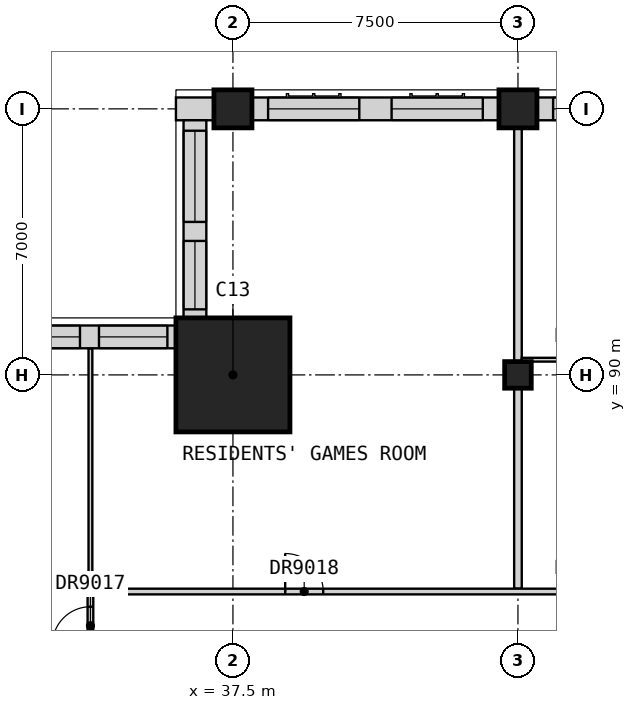
"""IFC4 building model, lengths in metres.
Left out: names, types, materials, properties, quantities, classifications, styles, units other than length and angle.
Written with IfcOpenShell. Run it as: python <this file> out.ifc"""

import sys

from ifc_helpers import new_model, si_unit, direction, frame, frame_2d, origin, origin_2d, place, context, subcontext, project, spatial, rectangle, extrude, element, fill, save


model = new_model("IFC4")
c1 = context("Model", 3, precision=1e-05, world=origin(), true_north=direction((0.0, 1.0)))
c2 = subcontext(c1, "Body", "Model", "MODEL_VIEW")
j1 = project(units=[si_unit("LENGTHUNIT", "METRE"), si_unit("PLANEANGLEUNIT", "RADIAN")], contexts=[c1])
p1 = place(None, origin())
s1 = spatial("IfcSite", under=j1, at=p1, CompositionType="ELEMENT")
p2 = place(p1, origin())
s2 = spatial("IfcBuilding", under=s1, at=p2, CompositionType="ELEMENT")
p3 = place(p2, frame((0.0, 0.0, 269.7)))
s3 = spatial("IfcBuildingStorey", under=s2, at=p3, CompositionType="ELEMENT", Elevation=269.7)
p4 = place(p3, frame((37.5, 97.0, 0.0), z_axis=(0.0, 0.0, 1.0), x_axis=(1.0, 0.0, 0.0)))
e1 = element("IfcColumn", 1, at=p4, inside=s3, PredefinedType="COLUMN", context=c2, shape_type="SweptSolid", body=[
    extrude(rectangle(XDim=1.0, YDim=1.0, at=origin_2d()), origin(), (0.0, 0.0, 1.0), 3.5),
])
p5 = place(p3, frame((45.0, 90.0, 0.0), z_axis=(0.0, 0.0, 1.0), x_axis=(1.0, 0.0, 0.0)))
e2 = element("IfcColumn", 2, at=p5, inside=s3, PredefinedType="COLUMN", context=c2, shape_type="SweptSolid", body=[
    extrude(rectangle(XDim=0.7, YDim=0.7, at=origin_2d()), origin(), (0.0, 0.0, 1.0), 3.5),
])
p6 = place(p3, frame((45.0, 97.0, 0.0), z_axis=(0.0, 0.0, 1.0), x_axis=(1.0, 0.0, 0.0)))
e3 = element("IfcColumn", 3, at=p6, inside=s3, PredefinedType="COLUMN", context=c2, shape_type="SweptSolid", body=[
    extrude(rectangle(XDim=1.0, YDim=1.0, at=origin_2d()), origin(), (0.0, 0.0, 1.0), 3.5),
])
p7 = place(p3, frame((37.5, 90.0, 0.0), z_axis=(0.0, 0.0, 1.0), x_axis=(1.0, 0.0, 0.0)))
e4 = element("IfcColumn", 4, at=p7, inside=s3, PredefinedType="COLUMN", context=c2, shape_type="SweptSolid", body=[
    extrude(rectangle(XDim=3.0, YDim=3.0, at=origin_2d()), origin(), (0.0, 0.0, 1.0), 3.5),
])
p8 = place(p3, frame((52.0, 97.0, 0.0), z_axis=(0.0, 0.0, 1.0), x_axis=(-1.0, 0.0, 0.0)))
e5 = element("IfcWall", 5, at=p8, inside=s3, PredefinedType="SOLIDWALL", context=c2, shape_type="SweptSolid", body=[
    extrude(rectangle(XDim=6.5, YDim=0.6, at=frame_2d((3.25, 0.0))), origin(), (0.0, 0.0, 1.0), 2.75),
])
p9 = place(p8, frame((3.675, 0.0, 0.8)))
e6 = element("IfcOpeningElement", 6, at=p9, cuts=e5, PredefinedType="OPENING", context=c2, shape_type="SweptSolid", body=[
    extrude(rectangle(XDim=2.4, YDim=1.8, at=frame_2d((1.2, 0.9))), frame((0.0, 0.31, 0.0), z_axis=(0.0, -1.0, 0.0), x_axis=(1.0, 0.0, 0.0)), (0.0, 0.0, 1.0), 0.62),
])
p10 = place(p8, frame((0.425, 0.0, 0.8)))
e7 = element("IfcOpeningElement", 7, at=p10, cuts=e5, PredefinedType="OPENING", context=c2, shape_type="SweptSolid", body=[
    extrude(rectangle(XDim=2.4, YDim=1.8, at=frame_2d((1.2, 0.9))), frame((0.0, 0.31, 0.0), z_axis=(0.0, -1.0, 0.0), x_axis=(1.0, 0.0, 0.0)), (0.0, 0.0, 1.0), 0.62),
])
p11 = place(p3, frame((44.5, 97.0, 0.0), z_axis=(0.0, 0.0, 1.0), x_axis=(-1.0, 0.0, 0.0)))
e8 = element("IfcWall", 8, at=p11, inside=s3, PredefinedType="SOLIDWALL", context=c2, shape_type="SweptSolid", body=[
    extrude(rectangle(XDim=6.5, YDim=0.6, at=frame_2d((3.25, 0.0))), origin(), (0.0, 0.0, 1.0), 2.75),
])
p12 = place(p11, frame((3.675, 0.0, 0.8)))
e9 = element("IfcOpeningElement", 9, at=p12, cuts=e8, PredefinedType="OPENING", context=c2, shape_type="SweptSolid", body=[
    extrude(rectangle(XDim=2.4, YDim=1.8, at=frame_2d((1.2, 0.9))), frame((0.0, 0.31, 0.0), z_axis=(0.0, -1.0, 0.0), x_axis=(1.0, 0.0, 0.0)), (0.0, 0.0, 1.0), 0.62),
])
p13 = place(p11, frame((0.425, 0.0, 0.8)))
e10 = element("IfcOpeningElement", 10, at=p13, cuts=e8, PredefinedType="OPENING", context=c2, shape_type="SweptSolid", body=[
    extrude(rectangle(XDim=2.4, YDim=1.8, at=frame_2d((1.2, 0.9))), frame((0.0, 0.31, 0.0), z_axis=(0.0, -1.0, 0.0), x_axis=(1.0, 0.0, 0.0)), (0.0, 0.0, 1.0), 0.62),
])
p14 = place(p3, frame((37.0, 97.0, 0.0), z_axis=(0.0, 0.0, 1.0), x_axis=(-1.0, 0.0, 0.0)))
e11 = element("IfcWall", 11, at=p14, inside=s3, PredefinedType="SOLIDWALL", context=c2, shape_type="SweptSolid", body=[
    extrude(rectangle(XDim=1.0, YDim=0.6, at=frame_2d((0.5, 0.0))), origin(), (0.0, 0.0, 1.0), 3.25),
])
p15 = place(p3, frame((36.5, 96.7, 0.0), z_axis=(0.0, 0.0, 1.0), x_axis=(0.0, -1.0, 0.0)))
e12 = element("IfcWall", 12, at=p15, inside=s3, PredefinedType="SOLIDWALL", context=c2, shape_type="SweptSolid", body=[
    extrude(rectangle(XDim=5.2, YDim=0.6, at=frame_2d((2.6, 0.0))), origin(), (0.0, 0.0, 1.0), 3.25),
])
p16 = place(p15, frame((3.175, 0.0, 0.8)))
e13 = element("IfcOpeningElement", 13, at=p16, cuts=e12, PredefinedType="OPENING", context=c2, shape_type="SweptSolid", body=[
    extrude(rectangle(XDim=1.8, YDim=1.8, at=frame_2d((0.9, 0.9))), frame((0.0, 0.31, 0.0), z_axis=(0.0, -1.0, 0.0), x_axis=(1.0, 0.0, 0.0)), (0.0, 0.0, 1.0), 0.62),
])
p17 = place(p15, frame((0.275, 0.0, 0.8)))
e14 = element("IfcOpeningElement", 14, at=p17, cuts=e12, PredefinedType="OPENING", context=c2, shape_type="SweptSolid", body=[
    extrude(rectangle(XDim=2.4, YDim=1.8, at=frame_2d((1.2, 0.9))), frame((0.0, 0.31, 0.0), z_axis=(0.0, -1.0, 0.0), x_axis=(1.0, 0.0, 0.0)), (0.0, 0.0, 1.0), 0.62),
])
p18 = place(p3, frame((36.0, 91.0, 0.0), z_axis=(0.0, 0.0, 1.0), x_axis=(-1.0, 0.0, 0.0)))
e15 = element("IfcWall", 15, at=p18, inside=s3, PredefinedType="SOLIDWALL", context=c2, shape_type="SweptSolid", body=[
    extrude(rectangle(XDim=5.2, YDim=0.6, at=frame_2d((2.6, 0.0))), origin(), (0.0, 0.0, 1.0), 3.25),
])
p19 = place(p18, frame((2.525, 0.0, 0.8)))
e16 = element("IfcOpeningElement", 16, at=p19, cuts=e15, PredefinedType="OPENING", context=c2, shape_type="SweptSolid", body=[
    extrude(rectangle(XDim=2.4, YDim=1.8, at=frame_2d((1.2, 0.9))), frame((0.0, 0.31, 0.0), z_axis=(0.0, -1.0, 0.0), x_axis=(1.0, 0.0, 0.0)), (0.0, 0.0, 1.0), 0.62),
])
p20 = place(p18, frame((0.225, 0.0, 0.8)))
e17 = element("IfcOpeningElement", 17, at=p20, cuts=e15, PredefinedType="OPENING", context=c2, shape_type="SweptSolid", body=[
    extrude(rectangle(XDim=1.8, YDim=1.8, at=frame_2d((0.9, 0.9))), frame((0.0, 0.31, 0.0), z_axis=(0.0, -1.0, 0.0), x_axis=(1.0, 0.0, 0.0)), (0.0, 0.0, 1.0), 0.62),
])
p21 = place(p3, frame((45.0, 84.375, 0.0), z_axis=(0.0, 0.0, 1.0), x_axis=(0.0, 1.0, 0.0)))
e18 = element("IfcWall", 18, at=p21, inside=s3, PredefinedType="PARTITIONING", context=c2, shape_type="SweptSolid", body=[
    extrude(rectangle(XDim=13.125, YDim=0.2, at=frame_2d((6.562, 0.0))), origin(), (0.0, 0.0, 1.0), 3.25),
])
p22 = place(p3, frame((33.75, 84.3, 0.0), z_axis=(0.0, 0.0, 1.0), x_axis=(1.0, 0.0, 0.0)))
e19 = element("IfcWall", 19, at=p22, inside=s3, PredefinedType="PARTITIONING", context=c2, shape_type="SweptSolid", body=[
    extrude(rectangle(XDim=28.05, YDim=0.15, at=frame_2d((14.025, 0.0))), origin(), (0.0, 0.0, 1.0), 3.25),
])
p23 = place(p22, frame((5.125, 0.0, 0.0)))
e20 = element("IfcOpeningElement", 20, at=p23, cuts=e19, PredefinedType="OPENING", context=c2, shape_type="SweptSolid", body=[
    extrude(rectangle(XDim=1.0, YDim=2.1, at=frame_2d((0.5, 1.05))), frame((0.0, 0.085, 0.0), z_axis=(0.0, -1.0, 0.0), x_axis=(1.0, 0.0, 0.0)), (0.0, 0.0, 1.0), 0.17),
])
p24 = place(p22, frame((12.675, 0.0, 0.0)))
e21 = element("IfcOpeningElement", 21, at=p24, cuts=e19, PredefinedType="OPENING", context=c2, shape_type="SweptSolid", body=[
    extrude(rectangle(XDim=0.9, YDim=2.1, at=frame_2d((0.45, 1.05))), frame((0.0, 0.085, 0.0), z_axis=(0.0, -1.0, 0.0), x_axis=(1.0, 0.0, 0.0)), (0.0, 0.0, 1.0), 0.17),
])
p25 = place(p22, frame((26.65, 0.0, 0.0)))
e22 = element("IfcOpeningElement", 22, at=p25, cuts=e19, PredefinedType="OPENING", context=c2, shape_type="SweptSolid", body=[
    extrude(rectangle(XDim=1.0, YDim=2.1, at=frame_2d((0.5, 1.05))), frame((0.0, 0.085, 0.0), z_axis=(0.0, -1.0, 0.0), x_axis=(1.0, 0.0, 0.0)), (0.0, 0.0, 1.0), 0.17),
])
p26 = place(p3, frame((33.75, 82.5, 0.0), z_axis=(0.0, 0.0, 1.0), x_axis=(0.0, 1.0, 0.0)))
e23 = element("IfcWall", 23, at=p26, inside=s3, PredefinedType="PARTITIONING", context=c2, shape_type="SweptSolid", body=[
    extrude(rectangle(XDim=1.725, YDim=0.15, at=frame_2d((0.863, 0.0))), origin(), (0.0, 0.0, 1.0), 3.25),
])
p27 = place(p26, frame((0.4, 0.0, 0.0)))
e24 = element("IfcOpeningElement", 24, at=p27, cuts=e23, PredefinedType="OPENING", context=c2, shape_type="SweptSolid", body=[
    extrude(rectangle(XDim=1.0, YDim=2.1, at=frame_2d((0.5, 1.05))), frame((0.0, 0.085, 0.0), z_axis=(0.0, -1.0, 0.0), x_axis=(1.0, 0.0, 0.0)), (0.0, 0.0, 1.0), 0.17),
])
p28 = place(p3, frame((45.1, 90.4, 0.0), z_axis=(0.0, 0.0, 1.0), x_axis=(1.0, 0.0, 0.0)))
e25 = element("IfcWall", 25, at=p28, inside=s3, PredefinedType="PARTITIONING", context=c2, shape_type="SweptSolid", body=[
    extrude(rectangle(XDim=14.8, YDim=0.1, at=frame_2d((7.4, 0.0))), origin(), (0.0, 0.0, 1.0), 3.25),
])
p29 = place(p28, frame((1.325, 0.0, 0.0)))
e26 = element("IfcOpeningElement", 26, at=p29, cuts=e25, PredefinedType="OPENING", context=c2, shape_type="SweptSolid", body=[
    extrude(rectangle(XDim=0.9, YDim=2.1, at=frame_2d((0.45, 1.05))), frame((0.0, 0.06, 0.0), z_axis=(0.0, -1.0, 0.0), x_axis=(1.0, 0.0, 0.0)), (0.0, 0.0, 1.0), 0.12),
])
p30 = place(p28, frame((8.825, 0.0, 0.0)))
e27 = element("IfcOpeningElement", 27, at=p30, cuts=e25, PredefinedType="OPENING", context=c2, shape_type="SweptSolid", body=[
    extrude(rectangle(XDim=0.9, YDim=2.1, at=frame_2d((0.45, 1.05))), frame((0.0, 0.06, 0.0), z_axis=(0.0, -1.0, 0.0), x_axis=(1.0, 0.0, 0.0)), (0.0, 0.0, 1.0), 0.12),
])
p31 = place(p28, frame((12.575, 0.0, 0.0)))
e28 = element("IfcOpeningElement", 28, at=p31, cuts=e25, PredefinedType="OPENING", context=c2, shape_type="SweptSolid", body=[
    extrude(rectangle(XDim=0.9, YDim=2.1, at=frame_2d((0.45, 1.05))), frame((0.0, 0.06, 0.0), z_axis=(0.0, -1.0, 0.0), x_axis=(1.0, 0.0, 0.0)), (0.0, 0.0, 1.0), 0.12),
])
p32 = place(p3, frame((33.75, 84.375, 0.0), z_axis=(0.0, 0.0, 1.0), x_axis=(0.0, 1.0, 0.0)))
e29 = element("IfcWall", 29, at=p32, inside=s3, PredefinedType="PARTITIONING", context=c2, shape_type="SweptSolid", body=[
    extrude(rectangle(XDim=6.315, YDim=0.1, at=frame_2d((3.157, 0.0))), origin(), (0.0, 0.0, 1.0), 3.25),
])
p33 = place(p9, origin())
e30 = element("IfcWindow", 30, at=p33, inside=s3, PartitioningType="SINGLE_PANEL", PredefinedType="WINDOW", context=c2, shape_type="SweptSolid", body=[
    extrude(rectangle(XDim=2.4, YDim=1.8, at=frame_2d((1.2, 0.9))), frame((0.0, -0.07, 0.0), z_axis=(0.0, -1.0, 0.0), x_axis=(1.0, 0.0, 0.0)), (0.0, 0.0, 1.0), 0.06),
])
fill(e6, e30)
p34 = place(p12, origin())
e31 = element("IfcWindow", 31, at=p34, inside=s3, PartitioningType="SINGLE_PANEL", PredefinedType="WINDOW", context=c2, shape_type="SweptSolid", body=[
    extrude(rectangle(XDim=2.4, YDim=1.8, at=frame_2d((1.2, 0.9))), frame((0.0, -0.07, 0.0), z_axis=(0.0, -1.0, 0.0), x_axis=(1.0, 0.0, 0.0)), (0.0, 0.0, 1.0), 0.06),
])
fill(e9, e31)
p35 = place(p13, origin())
e32 = element("IfcWindow", 32, at=p35, inside=s3, PartitioningType="SINGLE_PANEL", PredefinedType="WINDOW", context=c2, shape_type="SweptSolid", body=[
    extrude(rectangle(XDim=2.4, YDim=1.8, at=frame_2d((1.2, 0.9))), frame((0.0, -0.07, 0.0), z_axis=(0.0, -1.0, 0.0), x_axis=(1.0, 0.0, 0.0)), (0.0, 0.0, 1.0), 0.06),
])
fill(e10, e32)
p36 = place(p16, origin())
e33 = element("IfcWindow", 33, at=p36, inside=s3, PartitioningType="SINGLE_PANEL", PredefinedType="WINDOW", context=c2, shape_type="SweptSolid", body=[
    extrude(rectangle(XDim=1.8, YDim=1.8, at=frame_2d((0.9, 0.9))), frame((0.0, -0.07, 0.0), z_axis=(0.0, -1.0, 0.0), x_axis=(1.0, 0.0, 0.0)), (0.0, 0.0, 1.0), 0.06),
])
fill(e13, e33)
p37 = place(p17, origin())
e34 = element("IfcWindow", 34, at=p37, inside=s3, PartitioningType="SINGLE_PANEL", PredefinedType="WINDOW", context=c2, shape_type="SweptSolid", body=[
    extrude(rectangle(XDim=2.4, YDim=1.8, at=frame_2d((1.2, 0.9))), frame((0.0, -0.07, 0.0), z_axis=(0.0, -1.0, 0.0), x_axis=(1.0, 0.0, 0.0)), (0.0, 0.0, 1.0), 0.06),
])
fill(e14, e34)
p38 = place(p19, origin())
e35 = element("IfcWindow", 35, at=p38, inside=s3, PartitioningType="SINGLE_PANEL", PredefinedType="WINDOW", context=c2, shape_type="SweptSolid", body=[
    extrude(rectangle(XDim=2.4, YDim=1.8, at=frame_2d((1.2, 0.9))), frame((0.0, -0.07, 0.0), z_axis=(0.0, -1.0, 0.0), x_axis=(1.0, 0.0, 0.0)), (0.0, 0.0, 1.0), 0.06),
])
fill(e16, e35)
p39 = place(p20, origin())
e36 = element("IfcWindow", 36, at=p39, inside=s3, PartitioningType="SINGLE_PANEL", PredefinedType="WINDOW", context=c2, shape_type="SweptSolid", body=[
    extrude(rectangle(XDim=1.8, YDim=1.8, at=frame_2d((0.9, 0.9))), frame((0.0, -0.07, 0.0), z_axis=(0.0, -1.0, 0.0), x_axis=(1.0, 0.0, 0.0)), (0.0, 0.0, 1.0), 0.06),
])
fill(e17, e36)
p40 = place(p27, origin())
e37 = element("IfcDoor", 37, at=p40, inside=s3, OperationType="SINGLE_SWING_LEFT", PredefinedType="DOOR", context=c2, shape_type="SweptSolid", body=[
    extrude(rectangle(XDim=1.0, YDim=2.1, at=frame_2d((0.5, 1.05))), frame((0.0, 0.025, 0.0), z_axis=(0.0, -1.0, 0.0), x_axis=(1.0, 0.0, 0.0)), (0.0, 0.0, 1.0), 0.05),
])
fill(e24, e37)
p41 = place(p23, origin())
e38 = element("IfcDoor", 38, at=p41, inside=s3, OperationType="SINGLE_SWING_LEFT", PredefinedType="DOOR", context=c2, shape_type="SweptSolid", body=[
    extrude(rectangle(XDim=1.0, YDim=2.1, at=frame_2d((0.5, 1.05))), frame((0.0, 0.025, 0.0), z_axis=(0.0, -1.0, 0.0), x_axis=(1.0, 0.0, 0.0)), (0.0, 0.0, 1.0), 0.05),
])
fill(e20, e38)
save(model, sys.argv[1])
